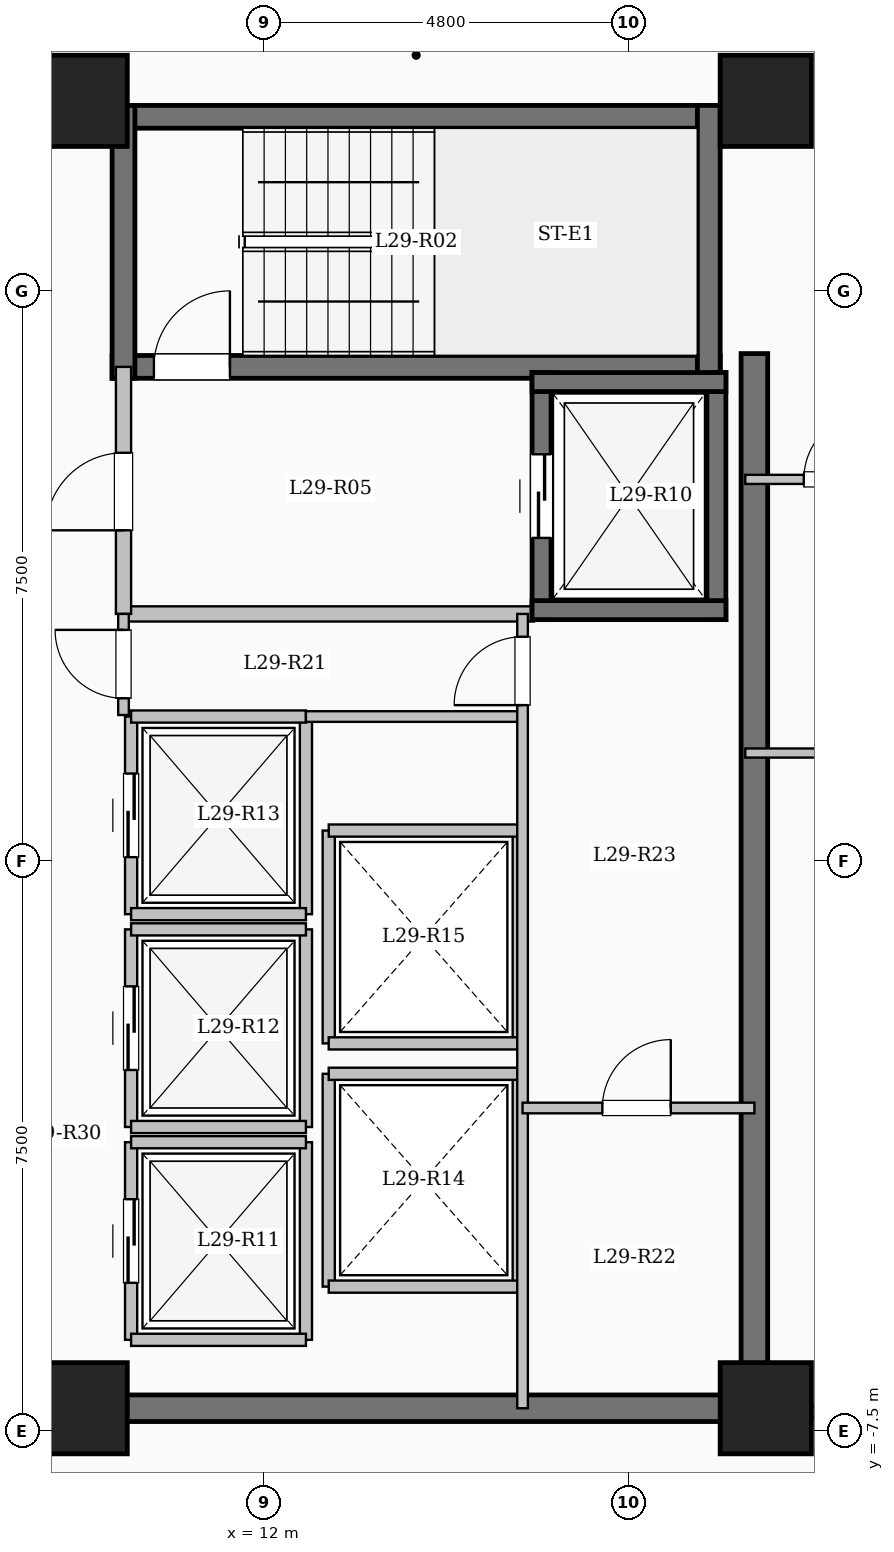
"""IFC4 building model, lengths in metres.
Left out: names, types, materials, properties, quantities, classifications, styles, units other than length and angle.
Written with IfcOpenShell. Run it as: python <this file> out.ifc"""

import sys

from ifc_helpers import new_model, si_unit, direction, frame, frame_2d, origin, origin_2d, place, context, subcontext, project, spatial, rectangle, extrude, element, fill, save


model = new_model("IFC4")
c1 = context("Model", 3, precision=1e-05, world=origin(), true_north=direction((0.0, 1.0)))
c2 = subcontext(c1, "Body", "Model", "MODEL_VIEW")
j1 = project(units=[si_unit("LENGTHUNIT", "METRE"), si_unit("PLANEANGLEUNIT", "RADIAN")], contexts=[c1])
p1 = place(None, origin())
s1 = spatial("IfcSite", under=j1, at=p1, CompositionType="ELEMENT")
p2 = place(p1, origin())
s2 = spatial("IfcBuilding", under=s1, at=p2, CompositionType="ELEMENT")
p3 = place(p2, frame((0.0, 0.0, 108.45)))
s3 = spatial("IfcBuildingStorey", under=s2, at=p3, CompositionType="ELEMENT", Elevation=108.45)
for number, where, z_axis, x_axis in (
    (1, (9.6, -7.2, 0.0), (0.0, 0.0, 1.0), (1.0, 0.0, 0.0)),
    (2, (9.6, 10.0, 0.0), (0.0, 0.0, 1.0), (1.0, 0.0, 0.0)),
    (3, (18.6, -7.2, 0.0), (0.0, 0.0, 1.0), (1.0, 0.0, 0.0)),
    (4, (18.6, 10.0, 0.0), (0.0, 0.0, 1.0), (1.0, 0.0, 0.0)),
):
    element("IfcColumn", number, at=place(p3, frame(where, z_axis=z_axis, x_axis=x_axis)), inside=s3, PredefinedType="COLUMN", context=c2, shape_type="SweptSolid", body=[
        extrude(rectangle(XDim=1.2, YDim=1.2, at=origin_2d()), origin(), (0.0, 0.0, 1.0), 3.35),
    ])
p4 = place(p3, frame((10.0, 9.79, 0.0), z_axis=(0.0, 0.0, 1.0), x_axis=(1.0, 0.0, 0.0)))
e5 = element("IfcWall", 5, at=p4, inside=s3, PredefinedType="SHEAR", context=c2, shape_type="SweptSolid", body=[
    extrude(rectangle(XDim=8.0, YDim=0.3, at=frame_2d((4.0, 0.0))), origin(), (0.0, 0.0, 1.0), 3.35),
])
p5 = place(p3, frame((10.0, 6.5, 0.0), z_axis=(0.0, 0.0, 1.0), x_axis=(1.0, 0.0, 0.0)))
e6 = element("IfcWall", 6, at=p5, inside=s3, PredefinedType="SHEAR", context=c2, shape_type="SweptSolid", body=[
    extrude(rectangle(XDim=8.0, YDim=0.3, at=frame_2d((4.0, 0.0))), origin(), (0.0, 0.0, 1.0), 3.35),
])
p6 = place(p5, frame((0.55, 0.0, 0.0)))
e7 = element("IfcOpeningElement", 7, at=p6, cuts=e6, PredefinedType="OPENING", context=c2, shape_type="SweptSolid", body=[
    extrude(rectangle(XDim=1.0, YDim=2.15, at=frame_2d((0.5, 1.075))), frame((0.0, 0.16, 0.0), z_axis=(0.0, -1.0, 0.0), x_axis=(1.0, 0.0, 0.0)), (0.0, 0.0, 1.0), 0.32),
])
for number, where, z_axis, x_axis in (
    (8, (10.15, 6.35, 0.0), (0.0, 0.0, 1.0), (0.0, 1.0, 0.0)),
    (9, (17.85, 6.35, 0.0), (0.0, 0.0, 1.0), (0.0, 1.0, 0.0)),
):
    element("IfcWall", number, at=place(p3, frame(where, z_axis=z_axis, x_axis=x_axis)), inside=s3, PredefinedType="SHEAR", context=c2, shape_type="SweptSolid", body=[
        extrude(rectangle(XDim=3.59, YDim=0.3, at=frame_2d((1.795, 0.0))), origin(), (0.0, 0.0, 1.0), 3.35),
    ])
p7 = place(p3, frame((10.15, 3.25, 0.0), z_axis=(0.0, 0.0, 1.0), x_axis=(1.0, 0.0, 0.0)))
e10 = element("IfcWall", 10, at=p7, inside=s3, PredefinedType="SOLIDWALL", context=c2, shape_type="SweptSolid", body=[
    extrude(rectangle(XDim=5.4, YDim=0.2, at=frame_2d((2.7, 0.0))), origin(), (0.0, 0.0, 1.0), 3.1),
])
p8 = place(p3, frame((10.15, 3.25, 0.0), z_axis=(0.0, 0.0, 1.0), x_axis=(0.0, 1.0, 0.0)))
e11 = element("IfcWall", 11, at=p8, inside=s3, PredefinedType="SOLIDWALL", context=c2, shape_type="SweptSolid", body=[
    extrude(rectangle(XDim=3.25, YDim=0.2, at=frame_2d((1.625, 0.0))), origin(), (0.0, 0.0, 1.0), 3.1),
])
p9 = place(p8, frame((1.1, 0.0, 0.0)))
e12 = element("IfcOpeningElement", 12, at=p9, cuts=e11, PredefinedType="OPENING", context=c2, shape_type="SweptSolid", body=[
    extrude(rectangle(XDim=1.02, YDim=2.15, at=frame_2d((0.51, 1.075))), frame((0.0, 0.11, 0.0), z_axis=(0.0, -1.0, 0.0), x_axis=(1.0, 0.0, 0.0)), (0.0, 0.0, 1.0), 0.22),
])
p10 = place(p3, frame((15.65, 3.175, 0.0), z_axis=(0.0, 0.0, 1.0), x_axis=(0.0, 1.0, 0.0)))
e13 = element("IfcWall", 13, at=p10, inside=s3, PredefinedType="SHEAR", context=c2, shape_type="SweptSolid", body=[
    extrude(rectangle(XDim=3.25, YDim=0.25, at=frame_2d((1.625, 0.0))), origin(), (0.0, 0.0, 1.0), 3.35),
])
p11 = place(p10, frame((1.075, 0.0, 0.0)))
e14 = element("IfcOpeningElement", 14, at=p11, cuts=e13, PredefinedType="OPENING", context=c2, shape_type="SweptSolid", body=[
    extrude(rectangle(XDim=1.1, YDim=2.15, at=frame_2d((0.55, 1.075))), frame((0.0, 0.135, 0.0), z_axis=(0.0, -1.0, 0.0), x_axis=(1.0, 0.0, 0.0)), (0.0, 0.0, 1.0), 0.27),
])
p12 = place(p3, frame((17.95, 3.175, 0.0), z_axis=(0.0, 0.0, 1.0), x_axis=(0.0, 1.0, 0.0)))
e15 = element("IfcWall", 15, at=p12, inside=s3, PredefinedType="SHEAR", context=c2, shape_type="SweptSolid", body=[
    extrude(rectangle(XDim=3.25, YDim=0.25, at=frame_2d((1.625, 0.0))), origin(), (0.0, 0.0, 1.0), 3.35),
])
for number, where, z_axis, x_axis in (
    (16, (15.525, 3.3, 0.0), (0.0, 0.0, 1.0), (1.0, 0.0, 0.0)),
    (17, (15.525, 6.3, 0.0), (0.0, 0.0, 1.0), (1.0, 0.0, 0.0)),
):
    element("IfcWall", number, at=place(p3, frame(where, z_axis=z_axis, x_axis=x_axis)), inside=s3, PredefinedType="SHEAR", context=c2, shape_type="SweptSolid", body=[
        extrude(rectangle(XDim=2.55, YDim=0.25, at=frame_2d((1.275, 0.0))), origin(), (0.0, 0.0, 1.0), 3.35),
    ])
p13 = place(p3, frame((10.25, -6.3, 0.0), z_axis=(0.0, 0.0, 1.0), x_axis=(0.0, 1.0, 0.0)))
e18 = element("IfcWall", 18, at=p13, inside=s3, PredefinedType="SOLIDWALL", context=c2, shape_type="SweptSolid", body=[
    extrude(rectangle(XDim=2.6, YDim=0.16, at=frame_2d((1.3, 0.0))), origin(), (0.0, 0.0, 1.0), 3.1),
])
p14 = place(p13, frame((0.75, 0.0, 0.0)))
e19 = element("IfcOpeningElement", 19, at=p14, cuts=e18, PredefinedType="OPENING", context=c2, shape_type="SweptSolid", body=[
    extrude(rectangle(XDim=1.1, YDim=2.15, at=frame_2d((0.55, 1.075))), frame((0.0, 0.09, 0.0), z_axis=(0.0, -1.0, 0.0), x_axis=(1.0, 0.0, 0.0)), (0.0, 0.0, 1.0), 0.18),
])
p15 = place(p3, frame((12.55, -6.3, 0.0), z_axis=(0.0, 0.0, 1.0), x_axis=(0.0, 1.0, 0.0)))
e20 = element("IfcWall", 20, at=p15, inside=s3, PredefinedType="SOLIDWALL", context=c2, shape_type="SweptSolid", body=[
    extrude(rectangle(XDim=2.6, YDim=0.16, at=frame_2d((1.3, 0.0))), origin(), (0.0, 0.0, 1.0), 3.1),
])
for number, where, z_axis, x_axis in (
    (21, (10.25, -6.3, 0.0), (0.0, 0.0, 1.0), (1.0, 0.0, 0.0)),
    (22, (10.25, -3.7, 0.0), (0.0, 0.0, 1.0), (1.0, 0.0, 0.0)),
):
    element("IfcWall", number, at=place(p3, frame(where, z_axis=z_axis, x_axis=x_axis)), inside=s3, PredefinedType="SOLIDWALL", context=c2, shape_type="SweptSolid", body=[
        extrude(rectangle(XDim=2.3, YDim=0.16, at=frame_2d((1.15, 0.0))), origin(), (0.0, 0.0, 1.0), 3.1),
    ])
p16 = place(p3, frame((10.25, -3.5, 0.0), z_axis=(0.0, 0.0, 1.0), x_axis=(0.0, 1.0, 0.0)))
e23 = element("IfcWall", 23, at=p16, inside=s3, PredefinedType="SOLIDWALL", context=c2, shape_type="SweptSolid", body=[
    extrude(rectangle(XDim=2.6, YDim=0.16, at=frame_2d((1.3, 0.0))), origin(), (0.0, 0.0, 1.0), 3.1),
])
p17 = place(p16, frame((0.75, 0.0, 0.0)))
e24 = element("IfcOpeningElement", 24, at=p17, cuts=e23, PredefinedType="OPENING", context=c2, shape_type="SweptSolid", body=[
    extrude(rectangle(XDim=1.1, YDim=2.15, at=frame_2d((0.55, 1.075))), frame((0.0, 0.09, 0.0), z_axis=(0.0, -1.0, 0.0), x_axis=(1.0, 0.0, 0.0)), (0.0, 0.0, 1.0), 0.18),
])
p18 = place(p3, frame((12.55, -3.5, 0.0), z_axis=(0.0, 0.0, 1.0), x_axis=(0.0, 1.0, 0.0)))
e25 = element("IfcWall", 25, at=p18, inside=s3, PredefinedType="SOLIDWALL", context=c2, shape_type="SweptSolid", body=[
    extrude(rectangle(XDim=2.6, YDim=0.16, at=frame_2d((1.3, 0.0))), origin(), (0.0, 0.0, 1.0), 3.1),
])
for number, where, z_axis, x_axis in (
    (26, (10.25, -3.5, 0.0), (0.0, 0.0, 1.0), (1.0, 0.0, 0.0)),
    (27, (10.25, -0.9, 0.0), (0.0, 0.0, 1.0), (1.0, 0.0, 0.0)),
):
    element("IfcWall", number, at=place(p3, frame(where, z_axis=z_axis, x_axis=x_axis)), inside=s3, PredefinedType="SOLIDWALL", context=c2, shape_type="SweptSolid", body=[
        extrude(rectangle(XDim=2.3, YDim=0.16, at=frame_2d((1.15, 0.0))), origin(), (0.0, 0.0, 1.0), 3.1),
    ])
p19 = place(p3, frame((10.25, -0.7, 0.0), z_axis=(0.0, 0.0, 1.0), x_axis=(0.0, 1.0, 0.0)))
e28 = element("IfcWall", 28, at=p19, inside=s3, PredefinedType="SOLIDWALL", context=c2, shape_type="SweptSolid", body=[
    extrude(rectangle(XDim=2.6, YDim=0.16, at=frame_2d((1.3, 0.0))), origin(), (0.0, 0.0, 1.0), 3.1),
])
p20 = place(p19, frame((0.75, 0.0, 0.0)))
e29 = element("IfcOpeningElement", 29, at=p20, cuts=e28, PredefinedType="OPENING", context=c2, shape_type="SweptSolid", body=[
    extrude(rectangle(XDim=1.1, YDim=2.15, at=frame_2d((0.55, 1.075))), frame((0.0, 0.09, 0.0), z_axis=(0.0, -1.0, 0.0), x_axis=(1.0, 0.0, 0.0)), (0.0, 0.0, 1.0), 0.18),
])
p21 = place(p3, frame((12.55, -0.7, 0.0), z_axis=(0.0, 0.0, 1.0), x_axis=(0.0, 1.0, 0.0)))
e30 = element("IfcWall", 30, at=p21, inside=s3, PredefinedType="SOLIDWALL", context=c2, shape_type="SweptSolid", body=[
    extrude(rectangle(XDim=2.6, YDim=0.16, at=frame_2d((1.3, 0.0))), origin(), (0.0, 0.0, 1.0), 3.1),
])
for number, where, z_axis, x_axis in (
    (31, (10.25, -0.7, 0.0), (0.0, 0.0, 1.0), (1.0, 0.0, 0.0)),
    (32, (10.25, 1.9, 0.0), (0.0, 0.0, 1.0), (1.0, 0.0, 0.0)),
):
    element("IfcWall", number, at=place(p3, frame(where, z_axis=z_axis, x_axis=x_axis)), inside=s3, PredefinedType="SOLIDWALL", context=c2, shape_type="SweptSolid", body=[
        extrude(rectangle(XDim=2.3, YDim=0.16, at=frame_2d((1.15, 0.0))), origin(), (0.0, 0.0, 1.0), 3.1),
    ])
for number, where, z_axis, x_axis in (
    (33, (12.85, -5.6, 0.0), (0.0, 0.0, 1.0), (0.0, 1.0, 0.0)),
    (34, (15.35, -5.6, 0.0), (0.0, 0.0, 1.0), (0.0, 1.0, 0.0)),
):
    element("IfcWall", number, at=place(p3, frame(where, z_axis=z_axis, x_axis=x_axis)), inside=s3, PredefinedType="SOLIDWALL", context=c2, shape_type="SweptSolid", body=[
        extrude(rectangle(XDim=2.8, YDim=0.16, at=frame_2d((1.4, 0.0))), origin(), (0.0, 0.0, 1.0), 3.1),
    ])
for number, where, z_axis, x_axis in (
    (35, (12.85, -5.6, 0.0), (0.0, 0.0, 1.0), (1.0, 0.0, 0.0)),
    (36, (12.85, -2.8, 0.0), (0.0, 0.0, 1.0), (1.0, 0.0, 0.0)),
):
    element("IfcWall", number, at=place(p3, frame(where, z_axis=z_axis, x_axis=x_axis)), inside=s3, PredefinedType="SOLIDWALL", context=c2, shape_type="SweptSolid", body=[
        extrude(rectangle(XDim=2.5, YDim=0.16, at=frame_2d((1.25, 0.0))), origin(), (0.0, 0.0, 1.0), 3.1),
    ])
for number, where, z_axis, x_axis in (
    (37, (12.85, -2.4, 0.0), (0.0, 0.0, 1.0), (0.0, 1.0, 0.0)),
    (38, (15.35, -2.4, 0.0), (0.0, 0.0, 1.0), (0.0, 1.0, 0.0)),
):
    element("IfcWall", number, at=place(p3, frame(where, z_axis=z_axis, x_axis=x_axis)), inside=s3, PredefinedType="SOLIDWALL", context=c2, shape_type="SweptSolid", body=[
        extrude(rectangle(XDim=2.8, YDim=0.16, at=frame_2d((1.4, 0.0))), origin(), (0.0, 0.0, 1.0), 3.1),
    ])
for number, where, z_axis, x_axis in (
    (39, (12.85, -2.4, 0.0), (0.0, 0.0, 1.0), (1.0, 0.0, 0.0)),
    (40, (12.85, 0.4, 0.0), (0.0, 0.0, 1.0), (1.0, 0.0, 0.0)),
):
    element("IfcWall", number, at=place(p3, frame(where, z_axis=z_axis, x_axis=x_axis)), inside=s3, PredefinedType="SOLIDWALL", context=c2, shape_type="SweptSolid", body=[
        extrude(rectangle(XDim=2.5, YDim=0.16, at=frame_2d((1.25, 0.0))), origin(), (0.0, 0.0, 1.0), 3.1),
    ])
p22 = place(p3, frame((18.45, -7.375, 0.0), z_axis=(0.0, 0.0, 1.0), x_axis=(0.0, 1.0, 0.0)))
e41 = element("IfcWall", 41, at=p22, inside=s3, PredefinedType="SHEAR", context=c2, shape_type="SweptSolid", body=[
    extrude(rectangle(XDim=14.05, YDim=0.35, at=frame_2d((7.025, 0.0))), origin(), (0.0, 0.0, 1.0), 3.35),
])
p23 = place(p3, frame((10.075, -7.2, 0.0), z_axis=(0.0, 0.0, 1.0), x_axis=(1.0, 0.0, 0.0)))
e42 = element("IfcWall", 42, at=p23, inside=s3, PredefinedType="SHEAR", context=c2, shape_type="SweptSolid", body=[
    extrude(rectangle(XDim=8.55, YDim=0.35, at=frame_2d((4.275, 0.0))), origin(), (0.0, 0.0, 1.0), 3.35),
])
p24 = place(p3, frame((12.55, 1.9, 0.0), z_axis=(0.0, 0.0, 1.0), x_axis=(1.0, 0.0, 0.0)))
e43 = element("IfcWall", 43, at=p24, inside=s3, PredefinedType="PARTITIONING", context=c2, shape_type="SweptSolid", body=[
    extrude(rectangle(XDim=2.85, YDim=0.14, at=frame_2d((1.425, 0.0))), origin(), (0.0, 0.0, 1.0), 3.1),
])
p25 = place(p3, frame((10.15, 1.92, 0.0), z_axis=(0.0, 0.0, 1.0), x_axis=(0.0, 1.0, 0.0)))
e44 = element("IfcWall", 44, at=p25, inside=s3, PredefinedType="PARTITIONING", context=c2, shape_type="SweptSolid", body=[
    extrude(rectangle(XDim=1.33, YDim=0.14, at=frame_2d((0.665, 0.0))), origin(), (0.0, 0.0, 1.0), 3.1),
])
p26 = place(p25, frame((0.22, 0.0, 0.0)))
e45 = element("IfcOpeningElement", 45, at=p26, cuts=e44, PredefinedType="OPENING", context=c2, shape_type="SweptSolid", body=[
    extrude(rectangle(XDim=0.9, YDim=2.08, at=frame_2d((0.45, 1.04))), frame((0.0, 0.08, 0.0), z_axis=(0.0, -1.0, 0.0), x_axis=(1.0, 0.0, 0.0)), (0.0, 0.0, 1.0), 0.16),
])
p27 = place(p3, frame((15.4, -7.2, 0.0), z_axis=(0.0, 0.0, 1.0), x_axis=(0.0, 1.0, 0.0)))
e46 = element("IfcWall", 46, at=p27, inside=s3, PredefinedType="PARTITIONING", context=c2, shape_type="SweptSolid", body=[
    extrude(rectangle(XDim=10.45, YDim=0.14, at=frame_2d((5.225, 0.0))), origin(), (0.0, 0.0, 1.0), 3.1),
])
p28 = place(p27, frame((9.25, 0.0, 0.0)))
e47 = element("IfcOpeningElement", 47, at=p28, cuts=e46, PredefinedType="OPENING", context=c2, shape_type="SweptSolid", body=[
    extrude(rectangle(XDim=0.9, YDim=2.08, at=frame_2d((0.45, 1.04))), frame((0.0, 0.08, 0.0), z_axis=(0.0, -1.0, 0.0), x_axis=(1.0, 0.0, 0.0)), (0.0, 0.0, 1.0), 0.16),
])
p29 = place(p3, frame((15.4, -3.25, 0.0), z_axis=(0.0, 0.0, 1.0), x_axis=(1.0, 0.0, 0.0)))
e48 = element("IfcWall", 48, at=p29, inside=s3, PredefinedType="PARTITIONING", context=c2, shape_type="SweptSolid", body=[
    extrude(rectangle(XDim=3.05, YDim=0.14, at=frame_2d((1.525, 0.0))), origin(), (0.0, 0.0, 1.0), 3.1),
])
p30 = place(p29, frame((1.05, 0.0, 0.0)))
e49 = element("IfcOpeningElement", 49, at=p30, cuts=e48, PredefinedType="OPENING", context=c2, shape_type="SweptSolid", body=[
    extrude(rectangle(XDim=0.9, YDim=2.08, at=frame_2d((0.45, 1.04))), frame((0.0, 0.08, 0.0), z_axis=(0.0, -1.0, 0.0), x_axis=(1.0, 0.0, 0.0)), (0.0, 0.0, 1.0), 0.16),
])
p31 = place(p3, frame((18.45, -7.25, 0.0), z_axis=(0.0, 0.0, 1.0), x_axis=(1.0, 0.0, 0.0)))
e50 = element("IfcWall", 50, at=p31, inside=s3, PredefinedType="PARTITIONING", context=c2, shape_type="SweptSolid", body=[
    extrude(rectangle(XDim=8.43, YDim=0.15, at=frame_2d((4.215, 0.0))), origin(), (0.0, 0.0, 1.0), 3.1),
])
p32 = place(p31, frame((1.95, 0.0, 0.0)))
e51 = element("IfcOpeningElement", 51, at=p32, cuts=e50, PredefinedType="OPENING", context=c2, shape_type="SweptSolid", body=[
    extrude(rectangle(XDim=0.96, YDim=2.15, at=frame_2d((0.48, 1.075))), frame((0.0, 0.085, 0.0), z_axis=(0.0, -1.0, 0.0), x_axis=(1.0, 0.0, 0.0)), (0.0, 0.0, 1.0), 0.17),
])
p33 = place(p3, frame((18.33, 1.42, 0.0), z_axis=(0.0, 0.0, 1.0), x_axis=(1.0, 0.0, 0.0)))
e52 = element("IfcWall", 52, at=p33, inside=s3, PredefinedType="PARTITIONING", context=c2, shape_type="SweptSolid", body=[
    extrude(rectangle(XDim=8.67, YDim=0.12, at=frame_2d((4.335, 0.0))), origin(), (0.0, 0.0, 1.0), 3.1),
])
p34 = place(p33, frame((1.863, 0.0, 0.0)))
e53 = element("IfcOpeningElement", 53, at=p34, cuts=e52, PredefinedType="OPENING", context=c2, shape_type="SweptSolid", body=[
    extrude(rectangle(XDim=0.88, YDim=2.1, at=frame_2d((0.44, 1.05))), frame((0.0, 0.07, 0.0), z_axis=(0.0, -1.0, 0.0), x_axis=(1.0, 0.0, 0.0)), (0.0, 0.0, 1.0), 0.14),
])
p35 = place(p33, frame((6.028, 0.0, 0.0)))
e54 = element("IfcOpeningElement", 54, at=p35, cuts=e52, PredefinedType="OPENING", context=c2, shape_type="SweptSolid", body=[
    extrude(rectangle(XDim=0.88, YDim=2.1, at=frame_2d((0.44, 1.05))), frame((0.0, 0.07, 0.0), z_axis=(0.0, -1.0, 0.0), x_axis=(1.0, 0.0, 0.0)), (0.0, 0.0, 1.0), 0.14),
])
p36 = place(p3, frame((18.33, 5.02, 0.0), z_axis=(0.0, 0.0, 1.0), x_axis=(1.0, 0.0, 0.0)))
e55 = element("IfcWall", 55, at=p36, inside=s3, PredefinedType="PARTITIONING", context=c2, shape_type="SweptSolid", body=[
    extrude(rectangle(XDim=8.67, YDim=0.12, at=frame_2d((4.335, 0.0))), origin(), (0.0, 0.0, 1.0), 3.1),
])
p37 = place(p36, frame((0.77, 0.0, 0.0)))
e56 = element("IfcOpeningElement", 56, at=p37, cuts=e55, PredefinedType="OPENING", context=c2, shape_type="SweptSolid", body=[
    extrude(rectangle(XDim=0.88, YDim=2.1, at=frame_2d((0.44, 1.05))), frame((0.0, 0.07, 0.0), z_axis=(0.0, -1.0, 0.0), x_axis=(1.0, 0.0, 0.0)), (0.0, 0.0, 1.0), 0.14),
])
p38 = place(p6, origin())
e57 = element("IfcDoor", 57, at=p38, inside=s3, OperationType="SINGLE_SWING_RIGHT", PredefinedType="DOOR", context=c2, shape_type="SweptSolid", body=[
    extrude(rectangle(XDim=1.0, YDim=2.15, at=frame_2d((0.5, 1.075))), frame((0.0, 0.025, 0.0), z_axis=(0.0, -1.0, 0.0), x_axis=(1.0, 0.0, 0.0)), (0.0, 0.0, 1.0), 0.05),
])
fill(e7, e57)
p39 = place(p9, origin())
e58 = element("IfcDoor", 58, at=p39, inside=s3, OperationType="SINGLE_SWING_LEFT", PredefinedType="DOOR", context=c2, shape_type="SweptSolid", body=[
    extrude(rectangle(XDim=1.02, YDim=2.15, at=frame_2d((0.51, 1.075))), frame((0.0, 0.025, 0.0), z_axis=(0.0, -1.0, 0.0), x_axis=(1.0, 0.0, 0.0)), (0.0, 0.0, 1.0), 0.05),
])
fill(e12, e58)
p40 = place(p11, origin())
e59 = element("IfcDoor", 59, at=p40, inside=s3, OperationType="SLIDING_TO_LEFT", PredefinedType="DOOR", context=c2, shape_type="SweptSolid", body=[
    extrude(rectangle(XDim=1.1, YDim=2.15, at=frame_2d((0.55, 1.075))), frame((0.0, 0.025, 0.0), z_axis=(0.0, -1.0, 0.0), x_axis=(1.0, 0.0, 0.0)), (0.0, 0.0, 1.0), 0.05),
])
fill(e14, e59)
p41 = place(p14, origin())
e60 = element("IfcDoor", 60, at=p41, inside=s3, OperationType="SLIDING_TO_LEFT", PredefinedType="DOOR", context=c2, shape_type="SweptSolid", body=[
    extrude(rectangle(XDim=1.1, YDim=2.15, at=frame_2d((0.55, 1.075))), frame((0.0, 0.025, 0.0), z_axis=(0.0, -1.0, 0.0), x_axis=(1.0, 0.0, 0.0)), (0.0, 0.0, 1.0), 0.05),
])
fill(e19, e60)
p42 = place(p17, origin())
e61 = element("IfcDoor", 61, at=p42, inside=s3, OperationType="SLIDING_TO_LEFT", PredefinedType="DOOR", context=c2, shape_type="SweptSolid", body=[
    extrude(rectangle(XDim=1.1, YDim=2.15, at=frame_2d((0.55, 1.075))), frame((0.0, 0.025, 0.0), z_axis=(0.0, -1.0, 0.0), x_axis=(1.0, 0.0, 0.0)), (0.0, 0.0, 1.0), 0.05),
])
fill(e24, e61)
p43 = place(p20, origin())
e62 = element("IfcDoor", 62, at=p43, inside=s3, OperationType="SLIDING_TO_LEFT", PredefinedType="DOOR", context=c2, shape_type="SweptSolid", body=[
    extrude(rectangle(XDim=1.1, YDim=2.15, at=frame_2d((0.55, 1.075))), frame((0.0, 0.025, 0.0), z_axis=(0.0, -1.0, 0.0), x_axis=(1.0, 0.0, 0.0)), (0.0, 0.0, 1.0), 0.05),
])
fill(e29, e62)
p44 = place(p26, origin())
e63 = element("IfcDoor", 63, at=p44, inside=s3, OperationType="SINGLE_SWING_RIGHT", PredefinedType="DOOR", context=c2, shape_type="SweptSolid", body=[
    extrude(rectangle(XDim=0.9, YDim=2.08, at=frame_2d((0.45, 1.04))), frame((0.0, 0.025, 0.0), z_axis=(0.0, -1.0, 0.0), x_axis=(1.0, 0.0, 0.0)), (0.0, 0.0, 1.0), 0.05),
])
fill(e45, e63)
p45 = place(p28, origin())
e64 = element("IfcDoor", 64, at=p45, inside=s3, OperationType="SINGLE_SWING_LEFT", PredefinedType="DOOR", context=c2, shape_type="SweptSolid", body=[
    extrude(rectangle(XDim=0.9, YDim=2.08, at=frame_2d((0.45, 1.04))), frame((0.0, 0.025, 0.0), z_axis=(0.0, -1.0, 0.0), x_axis=(1.0, 0.0, 0.0)), (0.0, 0.0, 1.0), 0.05),
])
fill(e47, e64)
p46 = place(p30, origin())
e65 = element("IfcDoor", 65, at=p46, inside=s3, OperationType="SINGLE_SWING_RIGHT", PredefinedType="DOOR", context=c2, shape_type="SweptSolid", body=[
    extrude(rectangle(XDim=0.9, YDim=2.08, at=frame_2d((0.45, 1.04))), frame((0.0, 0.025, 0.0), z_axis=(0.0, -1.0, 0.0), x_axis=(1.0, 0.0, 0.0)), (0.0, 0.0, 1.0), 0.05),
])
fill(e49, e65)
p47 = place(p37, origin())
e66 = element("IfcDoor", 66, at=p47, inside=s3, OperationType="SINGLE_SWING_RIGHT", PredefinedType="DOOR", context=c2, shape_type="SweptSolid", body=[
    extrude(rectangle(XDim=0.88, YDim=2.1, at=frame_2d((0.44, 1.05))), frame((0.0, 0.025, 0.0), z_axis=(0.0, -1.0, 0.0), x_axis=(1.0, 0.0, 0.0)), (0.0, 0.0, 1.0), 0.05),
])
fill(e56, e66)
save(model, sys.argv[1])
